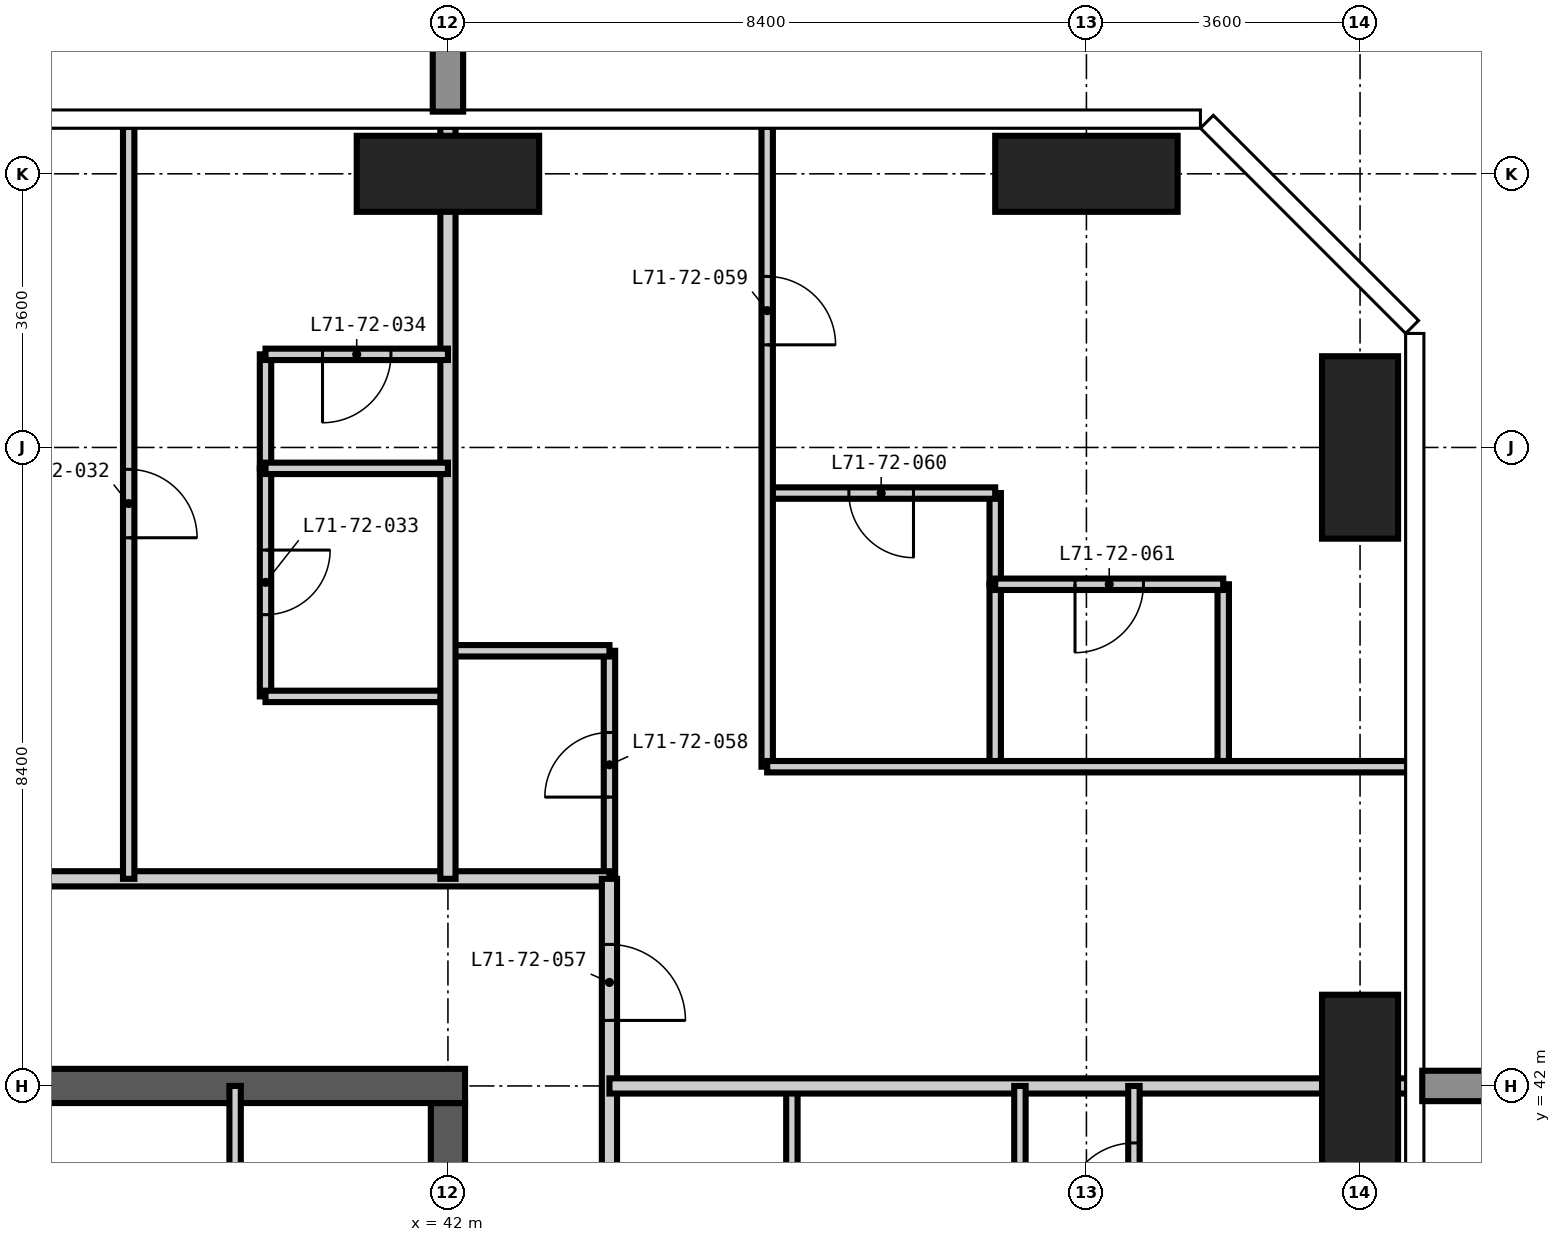
"""IFC4 building model, lengths in metres.
Left out: names, types, materials, properties, quantities, classifications, styles, units other than length and angle.
Written with IfcOpenShell. Run it as: python <this file> out.ifc"""

import sys

from ifc_helpers import new_model, si_unit, direction, frame, frame_2d, origin, origin_2d, place, context, subcontext, project, spatial, rectangle, extrude, element, fill, save


model = new_model("IFC4")
c1 = context("Model", 3, precision=1e-05, world=origin(), true_north=direction((0.0, 1.0)))
c2 = subcontext(c1, "Body", "Model", "MODEL_VIEW")
j1 = project(units=[si_unit("LENGTHUNIT", "METRE"), si_unit("PLANEANGLEUNIT", "RADIAN")], contexts=[c1])
p1 = place(None, origin())
s1 = spatial("IfcSite", under=j1, at=p1, CompositionType="ELEMENT")
p2 = place(p1, origin())
s2 = spatial("IfcBuilding", under=s1, at=p2, CompositionType="ELEMENT")
p3 = place(p2, frame((0.0, 0.0, 276.3)))
s3 = spatial("IfcBuildingStorey", under=s2, at=p3, CompositionType="ELEMENT", Elevation=276.3)
for number, where, z_axis, x_axis in (
    (1, (42.0, 54.0, -0.35), (0.0, 0.0, 1.0), (1.0, 0.0, 0.0)),
    (2, (50.4, 54.0, -0.35), (0.0, 0.0, 1.0), (1.0, 0.0, 0.0)),
):
    element("IfcColumn", number, at=place(p3, frame(where, z_axis=z_axis, x_axis=x_axis)), inside=s3, PredefinedType="COLUMN", context=c2, shape_type="SweptSolid", body=[
        extrude(rectangle(XDim=2.4, YDim=1.0, at=origin_2d()), origin(), (0.0, 0.0, 1.0), 3.9),
    ])
for number, where, z_axis, x_axis in (
    (3, (54.0, 42.0, -0.35), (0.0, 0.0, 1.0), (1.0, 0.0, 0.0)),
    (4, (54.0, 50.4, -0.35), (0.0, 0.0, 1.0), (1.0, 0.0, 0.0)),
):
    element("IfcColumn", number, at=place(p3, frame(where, z_axis=z_axis, x_axis=x_axis)), inside=s3, PredefinedType="COLUMN", context=c2, shape_type="SweptSolid", body=[
        extrude(rectangle(XDim=1.0, YDim=2.4, at=origin_2d()), origin(), (0.0, 0.0, 1.0), 3.9),
    ])
p4 = place(p3, frame((42.0, 17.025, -0.35), z_axis=(0.0, 0.0, 1.0), x_axis=(0.0, 1.0, 0.0)))
e5 = element("IfcWall", 5, at=p4, inside=s3, PredefinedType="SHEAR", context=c2, shape_type="SweptSolid", body=[
    extrude(rectangle(XDim=24.75, YDim=0.45, at=frame_2d((12.375, 0.0))), origin(), (0.0, 0.0, 1.0), 3.9),
])
p5 = place(p4, frame((0.575, 0.0, 0.35)))
e6 = element("IfcOpeningElement", 6, at=p5, cuts=e5, PredefinedType="OPENING", context=c2, shape_type="SweptSolid", body=[
    extrude(rectangle(XDim=1.2, YDim=2.2, at=frame_2d((0.6, 1.1))), frame((0.0, 0.235, 0.0), z_axis=(0.0, -1.0, 0.0), x_axis=(1.0, 0.0, 0.0)), (0.0, 0.0, 1.0), 0.47),
])
p6 = place(p4, frame((11.475, 0.0, 0.35)))
e7 = element("IfcOpeningElement", 7, at=p6, cuts=e5, PredefinedType="OPENING", context=c2, shape_type="SweptSolid", body=[
    extrude(rectangle(XDim=1.8, YDim=2.2, at=frame_2d((0.9, 1.1))), frame((0.0, 0.235, 0.0), z_axis=(0.0, -1.0, 0.0), x_axis=(1.0, 0.0, 0.0)), (0.0, 0.0, 1.0), 0.47),
])
p7 = place(p4, frame((20.275, 0.0, 0.35)))
e8 = element("IfcOpeningElement", 8, at=p7, cuts=e5, PredefinedType="OPENING", context=c2, shape_type="SweptSolid", body=[
    extrude(rectangle(XDim=1.0, YDim=2.1, at=frame_2d((0.5, 1.05))), frame((0.0, 0.235, 0.0), z_axis=(0.0, -1.0, 0.0), x_axis=(1.0, 0.0, 0.0)), (0.0, 0.0, 1.0), 0.47),
])
p8 = place(p3, frame((42.225, 42.0, -0.35), z_axis=(0.0, 0.0, 1.0), x_axis=(-1.0, 0.0, 0.0)))
e9 = element("IfcWall", 9, at=p8, inside=s3, PredefinedType="SHEAR", context=c2, shape_type="SweptSolid", body=[
    extrude(rectangle(XDim=17.25, YDim=0.45, at=frame_2d((8.625, 0.0))), origin(), (0.0, 0.0, 1.0), 3.9),
])
p9 = place(p8, frame((10.125, 0.0, 0.35)))
e10 = element("IfcOpeningElement", 10, at=p9, cuts=e9, PredefinedType="OPENING", context=c2, shape_type="SweptSolid", body=[
    extrude(rectangle(XDim=1.2, YDim=2.2, at=frame_2d((0.6, 1.1))), frame((0.0, 0.235, 0.0), z_axis=(0.0, -1.0, 0.0), x_axis=(1.0, 0.0, 0.0)), (0.0, 0.0, 1.0), 0.47),
])
p10 = place(p3, frame((39.6, 47.125, 0.0), z_axis=(0.0, 0.0, 1.0), x_axis=(0.0, 1.0, 0.0)))
e11 = element("IfcWall", 11, at=p10, inside=s3, PredefinedType="PARTITIONING", context=c2, shape_type="SweptSolid", body=[
    extrude(rectangle(XDim=3.0, YDim=0.15, at=frame_2d((1.5, 0.0))), origin(), (0.0, 0.0, 1.0), 3.55),
])
p11 = place(p10, frame((1.075, 0.0, 0.0)))
e12 = element("IfcOpeningElement", 12, at=p11, cuts=e11, PredefinedType="OPENING", context=c2, shape_type="SweptSolid", body=[
    extrude(rectangle(XDim=0.85, YDim=2.1, at=frame_2d((0.425, 1.05))), frame((0.0, 0.085, 0.0), z_axis=(0.0, -1.0, 0.0), x_axis=(1.0, 0.0, 0.0)), (0.0, 0.0, 1.0), 0.17),
])
p12 = place(p3, frame((44.125, 44.725, 0.0), z_axis=(0.0, 0.0, 1.0), x_axis=(0.0, 1.0, 0.0)))
e13 = element("IfcWall", 13, at=p12, inside=s3, PredefinedType="PARTITIONING", context=c2, shape_type="SweptSolid", body=[
    extrude(rectangle(XDim=3.0, YDim=0.15, at=frame_2d((1.5, 0.0))), origin(), (0.0, 0.0, 1.0), 3.55),
])
p13 = place(p12, frame((1.075, 0.0, 0.0)))
e14 = element("IfcOpeningElement", 14, at=p13, cuts=e13, PredefinedType="OPENING", context=c2, shape_type="SweptSolid", body=[
    extrude(rectangle(XDim=0.85, YDim=2.1, at=frame_2d((0.425, 1.05))), frame((0.0, 0.085, 0.0), z_axis=(0.0, -1.0, 0.0), x_axis=(1.0, 0.0, 0.0)), (0.0, 0.0, 1.0), 0.17),
])
p14 = place(p3, frame((46.525, 39.6, 0.0), z_axis=(0.0, 0.0, 1.0), x_axis=(0.0, 1.0, 0.0)))
e15 = element("IfcWall", 15, at=p14, inside=s3, PredefinedType="PARTITIONING", context=c2, shape_type="SweptSolid", body=[
    extrude(rectangle(XDim=2.4, YDim=0.15, at=frame_2d((1.2, 0.0))), origin(), (0.0, 0.0, 1.0), 3.55),
])
p15 = place(p3, frame((49.2, 48.6, 0.0), z_axis=(0.0, 0.0, 1.0), x_axis=(0.0, 1.0, 0.0)))
e16 = element("IfcWall", 16, at=p15, inside=s3, PredefinedType="PARTITIONING", context=c2, shape_type="SweptSolid", body=[
    extrude(rectangle(XDim=1.2, YDim=0.15, at=frame_2d((0.6, 0.0))), origin(), (0.0, 0.0, 1.0), 3.55),
])
p16 = place(p3, frame((39.6, 47.125, 0.0), z_axis=(0.0, 0.0, 1.0), x_axis=(1.0, 0.0, 0.0)))
e17 = element("IfcWall", 17, at=p16, inside=s3, PredefinedType="PARTITIONING", context=c2, shape_type="SweptSolid", body=[
    extrude(rectangle(XDim=2.4, YDim=0.15, at=frame_2d((1.2, 0.0))), origin(), (0.0, 0.0, 1.0), 3.55),
])
p17 = place(p3, frame((42.0, 47.725, 0.0), z_axis=(0.0, 0.0, 1.0), x_axis=(1.0, 0.0, 0.0)))
e18 = element("IfcWall", 18, at=p17, inside=s3, PredefinedType="PARTITIONING", context=c2, shape_type="SweptSolid", body=[
    extrude(rectangle(XDim=2.125, YDim=0.15, at=frame_2d((1.062, 0.0))), origin(), (0.0, 0.0, 1.0), 3.55),
])
p18 = place(p3, frame((46.2, 49.8, 0.0), z_axis=(0.0, 0.0, 1.0), x_axis=(1.0, 0.0, 0.0)))
e19 = element("IfcWall", 19, at=p18, inside=s3, PredefinedType="PARTITIONING", context=c2, shape_type="SweptSolid", body=[
    extrude(rectangle(XDim=3.0, YDim=0.15, at=frame_2d((1.5, 0.0))), origin(), (0.0, 0.0, 1.0), 3.55),
])
p19 = place(p18, frame((1.075, 0.0, 0.0)))
e20 = element("IfcOpeningElement", 20, at=p19, cuts=e19, PredefinedType="OPENING", context=c2, shape_type="SweptSolid", body=[
    extrude(rectangle(XDim=0.85, YDim=2.1, at=frame_2d((0.425, 1.05))), frame((0.0, 0.085, 0.0), z_axis=(0.0, -1.0, 0.0), x_axis=(1.0, 0.0, 0.0)), (0.0, 0.0, 1.0), 0.17),
])
p20 = place(p3, frame((21.875, 44.725, 0.0), z_axis=(0.0, 0.0, 1.0), x_axis=(1.0, 0.0, 0.0)))
e21 = element("IfcWall", 21, at=p20, inside=s3, PredefinedType="PARTITIONING", context=c2, shape_type="SweptSolid", body=[
    extrude(rectangle(XDim=22.25, YDim=0.2, at=frame_2d((11.125, 0.0))), origin(), (0.0, 0.0, 1.0), 3.55),
])
p21 = place(p20, frame((10.025, 0.0, 0.0)))
e22 = element("IfcOpeningElement", 22, at=p21, cuts=e21, PredefinedType="OPENING", context=c2, shape_type="SweptSolid", body=[
    extrude(rectangle(XDim=1.0, YDim=2.2, at=frame_2d((0.5, 1.1))), frame((0.0, 0.11, 0.0), z_axis=(0.0, -1.0, 0.0), x_axis=(1.0, 0.0, 0.0)), (0.0, 0.0, 1.0), 0.22),
])
p22 = place(p3, frame((44.125, 44.725, 0.0), z_axis=(0.0, 0.0, 1.0), x_axis=(0.0, -1.0, 0.0)))
e23 = element("IfcWall", 23, at=p22, inside=s3, PredefinedType="PARTITIONING", context=c2, shape_type="SweptSolid", body=[
    extrude(rectangle(XDim=15.325, YDim=0.2, at=frame_2d((7.663, 0.0))), origin(), (0.0, 0.0, 1.0), 3.55),
])
p23 = place(p22, frame((8.525, 0.0, 0.0)))
e24 = element("IfcOpeningElement", 24, at=p23, cuts=e23, PredefinedType="OPENING", context=c2, shape_type="SweptSolid", body=[
    extrude(rectangle(XDim=1.0, YDim=2.2, at=frame_2d((0.5, 1.1))), frame((0.0, 0.11, 0.0), z_axis=(0.0, -1.0, 0.0), x_axis=(1.0, 0.0, 0.0)), (0.0, 0.0, 1.0), 0.22),
])
p24 = place(p22, frame((0.863, 0.0, 0.0)))
e25 = element("IfcOpeningElement", 25, at=p24, cuts=e23, PredefinedType="OPENING", context=c2, shape_type="SweptSolid", body=[
    extrude(rectangle(XDim=1.0, YDim=2.2, at=frame_2d((0.5, 1.1))), frame((0.0, 0.11, 0.0), z_axis=(0.0, -1.0, 0.0), x_axis=(1.0, 0.0, 0.0)), (0.0, 0.0, 1.0), 0.22),
])
p25 = place(p3, frame((42.0, 44.725, 0.0), z_axis=(0.0, 0.0, 1.0), x_axis=(0.0, 1.0, 0.0)))
e26 = element("IfcWall", 26, at=p25, inside=s3, PredefinedType="PARTITIONING", context=c2, shape_type="SweptSolid", body=[
    extrude(rectangle(XDim=9.893, YDim=0.2, at=frame_2d((4.946, 0.0))), origin(), (0.0, 0.0, 1.0), 3.55),
])
p26 = place(p3, frame((44.125, 42.0, 0.0), z_axis=(0.0, 0.0, 1.0), x_axis=(1.0, 0.0, 0.0)))
e27 = element("IfcWall", 27, at=p26, inside=s3, PredefinedType="PARTITIONING", context=c2, shape_type="SweptSolid", body=[
    extrude(rectangle(XDim=10.493, YDim=0.2, at=frame_2d((5.247, 0.0))), origin(), (0.0, 0.0, 1.0), 3.55),
])
p27 = place(p3, frame((37.8, 44.725, 0.0), z_axis=(0.0, 0.0, 1.0), x_axis=(0.0, 1.0, 0.0)))
e28 = element("IfcWall", 28, at=p27, inside=s3, PredefinedType="PARTITIONING", context=c2, shape_type="SweptSolid", body=[
    extrude(rectangle(XDim=9.893, YDim=0.15, at=frame_2d((4.946, 0.0))), origin(), (0.0, 0.0, 1.0), 3.55),
])
p28 = place(p27, frame((4.487, 0.0, 0.0)))
e29 = element("IfcOpeningElement", 29, at=p28, cuts=e28, PredefinedType="OPENING", context=c2, shape_type="SweptSolid", body=[
    extrude(rectangle(XDim=0.9, YDim=2.1, at=frame_2d((0.45, 1.05))), frame((0.0, 0.085, 0.0), z_axis=(0.0, -1.0, 0.0), x_axis=(1.0, 0.0, 0.0)), (0.0, 0.0, 1.0), 0.17),
])
p29 = place(p3, frame((39.2, 33.6, 0.0), z_axis=(0.0, 0.0, 1.0), x_axis=(0.0, 1.0, 0.0)))
e30 = element("IfcWall", 30, at=p29, inside=s3, PredefinedType="PARTITIONING", context=c2, shape_type="SweptSolid", body=[
    extrude(rectangle(XDim=8.4, YDim=0.15, at=frame_2d((4.2, 0.0))), origin(), (0.0, 0.0, 1.0), 3.55),
])
p30 = place(p29, frame((3.7, 0.0, 0.0)))
e31 = element("IfcOpeningElement", 31, at=p30, cuts=e30, PredefinedType="OPENING", context=c2, shape_type="SweptSolid", body=[
    extrude(rectangle(XDim=1.0, YDim=2.1, at=frame_2d((0.5, 1.05))), frame((0.0, 0.085, 0.0), z_axis=(0.0, -1.0, 0.0), x_axis=(1.0, 0.0, 0.0)), (0.0, 0.0, 1.0), 0.17),
])
p31 = place(p3, frame((39.6, 50.125, 0.0), z_axis=(0.0, 0.0, 1.0), x_axis=(0.0, 1.0, 0.0)))
e32 = element("IfcWall", 32, at=p31, inside=s3, PredefinedType="PARTITIONING", context=c2, shape_type="SweptSolid", body=[
    extrude(rectangle(XDim=1.5, YDim=0.15, at=frame_2d((0.75, 0.0))), origin(), (0.0, 0.0, 1.0), 3.55),
])
p32 = place(p3, frame((46.2, 46.2, 0.0), z_axis=(0.0, 0.0, 1.0), x_axis=(0.0, 1.0, 0.0)))
e33 = element("IfcWall", 33, at=p32, inside=s3, PredefinedType="PARTITIONING", context=c2, shape_type="SweptSolid", body=[
    extrude(rectangle(XDim=8.418, YDim=0.15, at=frame_2d((4.209, 0.0))), origin(), (0.0, 0.0, 1.0), 3.55),
])
p33 = place(p32, frame((5.55, 0.0, 0.0)))
e34 = element("IfcOpeningElement", 34, at=p33, cuts=e33, PredefinedType="OPENING", context=c2, shape_type="SweptSolid", body=[
    extrude(rectangle(XDim=0.9, YDim=2.1, at=frame_2d((0.45, 1.05))), frame((0.0, 0.085, 0.0), z_axis=(0.0, -1.0, 0.0), x_axis=(1.0, 0.0, 0.0)), (0.0, 0.0, 1.0), 0.17),
])
p34 = place(p3, frame((49.2, 46.2, 0.0), z_axis=(0.0, 0.0, 1.0), x_axis=(0.0, 1.0, 0.0)))
e35 = element("IfcWall", 35, at=p34, inside=s3, PredefinedType="PARTITIONING", context=c2, shape_type="SweptSolid", body=[
    extrude(rectangle(XDim=2.4, YDim=0.15, at=frame_2d((1.2, 0.0))), origin(), (0.0, 0.0, 1.0), 3.55),
])
p35 = place(p3, frame((49.525, 39.6, 0.0), z_axis=(0.0, 0.0, 1.0), x_axis=(0.0, 1.0, 0.0)))
e36 = element("IfcWall", 36, at=p35, inside=s3, PredefinedType="PARTITIONING", context=c2, shape_type="SweptSolid", body=[
    extrude(rectangle(XDim=2.4, YDim=0.15, at=frame_2d((1.2, 0.0))), origin(), (0.0, 0.0, 1.0), 3.55),
])
p36 = place(p3, frame((51.025, 39.6, 0.0), z_axis=(0.0, 0.0, 1.0), x_axis=(0.0, 1.0, 0.0)))
e37 = element("IfcWall", 37, at=p36, inside=s3, PredefinedType="PARTITIONING", context=c2, shape_type="SweptSolid", body=[
    extrude(rectangle(XDim=2.4, YDim=0.15, at=frame_2d((1.2, 0.0))), origin(), (0.0, 0.0, 1.0), 3.55),
])
p37 = place(p36, frame((0.75, 0.0, 0.0)))
e38 = element("IfcOpeningElement", 38, at=p37, cuts=e37, PredefinedType="OPENING", context=c2, shape_type="SweptSolid", body=[
    extrude(rectangle(XDim=0.9, YDim=2.1, at=frame_2d((0.45, 1.05))), frame((0.0, 0.085, 0.0), z_axis=(0.0, -1.0, 0.0), x_axis=(1.0, 0.0, 0.0)), (0.0, 0.0, 1.0), 0.17),
])
p38 = place(p3, frame((52.2, 46.2, 0.0), z_axis=(0.0, 0.0, 1.0), x_axis=(0.0, 1.0, 0.0)))
e39 = element("IfcWall", 39, at=p38, inside=s3, PredefinedType="PARTITIONING", context=c2, shape_type="SweptSolid", body=[
    extrude(rectangle(XDim=2.4, YDim=0.15, at=frame_2d((1.2, 0.0))), origin(), (0.0, 0.0, 1.0), 3.55),
])
p39 = place(p3, frame((46.2, 46.2, 0.0), z_axis=(0.0, 0.0, 1.0), x_axis=(1.0, 0.0, 0.0)))
e40 = element("IfcWall", 40, at=p39, inside=s3, PredefinedType="PARTITIONING", context=c2, shape_type="SweptSolid", body=[
    extrude(rectangle(XDim=8.418, YDim=0.15, at=frame_2d((4.209, 0.0))), origin(), (0.0, 0.0, 1.0), 3.55),
])
p40 = place(p3, frame((49.2, 48.6, 0.0), z_axis=(0.0, 0.0, 1.0), x_axis=(1.0, 0.0, 0.0)))
e41 = element("IfcWall", 41, at=p40, inside=s3, PredefinedType="PARTITIONING", context=c2, shape_type="SweptSolid", body=[
    extrude(rectangle(XDim=3.0, YDim=0.15, at=frame_2d((1.5, 0.0))), origin(), (0.0, 0.0, 1.0), 3.55),
])
p41 = place(p40, frame((1.05, 0.0, 0.0)))
e42 = element("IfcOpeningElement", 42, at=p41, cuts=e41, PredefinedType="OPENING", context=c2, shape_type="SweptSolid", body=[
    extrude(rectangle(XDim=0.9, YDim=2.1, at=frame_2d((0.45, 1.05))), frame((0.0, 0.085, 0.0), z_axis=(0.0, -1.0, 0.0), x_axis=(1.0, 0.0, 0.0)), (0.0, 0.0, 1.0), 0.17),
])
p42 = place(p3, frame((39.6, 50.125, 0.0), z_axis=(0.0, 0.0, 1.0), x_axis=(1.0, 0.0, 0.0)))
e43 = element("IfcWall", 43, at=p42, inside=s3, PredefinedType="PARTITIONING", context=c2, shape_type="SweptSolid", body=[
    extrude(rectangle(XDim=2.4, YDim=0.15, at=frame_2d((1.2, 0.0))), origin(), (0.0, 0.0, 1.0), 3.55),
])
p43 = place(p3, frame((39.6, 51.625, 0.0), z_axis=(0.0, 0.0, 1.0), x_axis=(1.0, 0.0, 0.0)))
e44 = element("IfcWall", 44, at=p43, inside=s3, PredefinedType="PARTITIONING", context=c2, shape_type="SweptSolid", body=[
    extrude(rectangle(XDim=2.4, YDim=0.15, at=frame_2d((1.2, 0.0))), origin(), (0.0, 0.0, 1.0), 3.55),
])
p44 = place(p43, frame((0.75, 0.0, 0.0)))
e45 = element("IfcOpeningElement", 45, at=p44, cuts=e44, PredefinedType="OPENING", context=c2, shape_type="SweptSolid", body=[
    extrude(rectangle(XDim=0.9, YDim=2.1, at=frame_2d((0.45, 1.05))), frame((0.0, 0.085, 0.0), z_axis=(0.0, -1.0, 0.0), x_axis=(1.0, 0.0, 0.0)), (0.0, 0.0, 1.0), 0.17),
])
p45 = place(p37, origin())
e46 = element("IfcDoor", 46, at=p45, inside=s3, OperationType="SINGLE_SWING_LEFT", PredefinedType="DOOR", context=c2, shape_type="SweptSolid", body=[
    extrude(rectangle(XDim=0.9, YDim=2.1, at=frame_2d((0.45, 1.05))), frame((0.0, 0.025, 0.0), z_axis=(0.0, -1.0, 0.0), x_axis=(1.0, 0.0, 0.0)), (0.0, 0.0, 1.0), 0.05),
])
fill(e38, e46)
p46 = place(p28, frame((0.9, 0.0, 0.0), z_axis=(0.0, 0.0, 1.0), x_axis=(-1.0, 0.0, 0.0)))
e47 = element("IfcDoor", 47, at=p46, inside=s3, OperationType="SINGLE_SWING_RIGHT", PredefinedType="DOOR", context=c2, shape_type="SweptSolid", body=[
    extrude(rectangle(XDim=0.9, YDim=2.1, at=frame_2d((0.45, 1.05))), frame((0.0, 0.025, 0.0), z_axis=(0.0, -1.0, 0.0), x_axis=(1.0, 0.0, 0.0)), (0.0, 0.0, 1.0), 0.05),
])
fill(e29, e47)
p47 = place(p11, frame((0.85, 0.0, 0.0), z_axis=(0.0, 0.0, 1.0), x_axis=(-1.0, 0.0, 0.0)))
e48 = element("IfcDoor", 48, at=p47, inside=s3, OperationType="SINGLE_SWING_LEFT", PredefinedType="DOOR", context=c2, shape_type="SweptSolid", body=[
    extrude(rectangle(XDim=0.85, YDim=2.1, at=frame_2d((0.425, 1.05))), frame((0.0, 0.025, 0.0), z_axis=(0.0, -1.0, 0.0), x_axis=(1.0, 0.0, 0.0)), (0.0, 0.0, 1.0), 0.05),
])
fill(e12, e48)
p48 = place(p44, frame((0.9, 0.0, 0.0), z_axis=(0.0, 0.0, 1.0), x_axis=(-1.0, 0.0, 0.0)))
e49 = element("IfcDoor", 49, at=p48, inside=s3, OperationType="SINGLE_SWING_RIGHT", PredefinedType="DOOR", context=c2, shape_type="SweptSolid", body=[
    extrude(rectangle(XDim=0.9, YDim=2.1, at=frame_2d((0.45, 1.05))), frame((0.0, 0.025, 0.0), z_axis=(0.0, -1.0, 0.0), x_axis=(1.0, 0.0, 0.0)), (0.0, 0.0, 1.0), 0.05),
])
fill(e45, e49)
p49 = place(p24, origin())
e50 = element("IfcDoor", 50, at=p49, inside=s3, OperationType="SINGLE_SWING_RIGHT", PredefinedType="DOOR", context=c2, shape_type="SweptSolid", body=[
    extrude(rectangle(XDim=1.0, YDim=2.2, at=frame_2d((0.5, 1.1))), frame((0.0, 0.025, 0.0), z_axis=(0.0, -1.0, 0.0), x_axis=(1.0, 0.0, 0.0)), (0.0, 0.0, 1.0), 0.05),
])
fill(e25, e50)
p50 = place(p13, origin())
e51 = element("IfcDoor", 51, at=p50, inside=s3, OperationType="SINGLE_SWING_LEFT", PredefinedType="DOOR", context=c2, shape_type="SweptSolid", body=[
    extrude(rectangle(XDim=0.85, YDim=2.1, at=frame_2d((0.425, 1.05))), frame((0.0, 0.025, 0.0), z_axis=(0.0, -1.0, 0.0), x_axis=(1.0, 0.0, 0.0)), (0.0, 0.0, 1.0), 0.05),
])
fill(e14, e51)
p51 = place(p33, frame((0.9, 0.0, 0.0), z_axis=(0.0, 0.0, 1.0), x_axis=(-1.0, 0.0, 0.0)))
e52 = element("IfcDoor", 52, at=p51, inside=s3, OperationType="SINGLE_SWING_RIGHT", PredefinedType="DOOR", context=c2, shape_type="SweptSolid", body=[
    extrude(rectangle(XDim=0.9, YDim=2.1, at=frame_2d((0.45, 1.05))), frame((0.0, 0.025, 0.0), z_axis=(0.0, -1.0, 0.0), x_axis=(1.0, 0.0, 0.0)), (0.0, 0.0, 1.0), 0.05),
])
fill(e34, e52)
p52 = place(p19, frame((0.85, 0.0, 0.0), z_axis=(0.0, 0.0, 1.0), x_axis=(-1.0, 0.0, 0.0)))
e53 = element("IfcDoor", 53, at=p52, inside=s3, OperationType="SINGLE_SWING_LEFT", PredefinedType="DOOR", context=c2, shape_type="SweptSolid", body=[
    extrude(rectangle(XDim=0.85, YDim=2.1, at=frame_2d((0.425, 1.05))), frame((0.0, 0.025, 0.0), z_axis=(0.0, -1.0, 0.0), x_axis=(1.0, 0.0, 0.0)), (0.0, 0.0, 1.0), 0.05),
])
fill(e20, e53)
p53 = place(p41, frame((0.9, 0.0, 0.0), z_axis=(0.0, 0.0, 1.0), x_axis=(-1.0, 0.0, 0.0)))
e54 = element("IfcDoor", 54, at=p53, inside=s3, OperationType="SINGLE_SWING_RIGHT", PredefinedType="DOOR", context=c2, shape_type="SweptSolid", body=[
    extrude(rectangle(XDim=0.9, YDim=2.1, at=frame_2d((0.45, 1.05))), frame((0.0, 0.025, 0.0), z_axis=(0.0, -1.0, 0.0), x_axis=(1.0, 0.0, 0.0)), (0.0, 0.0, 1.0), 0.05),
])
fill(e42, e54)
save(model, sys.argv[1])
